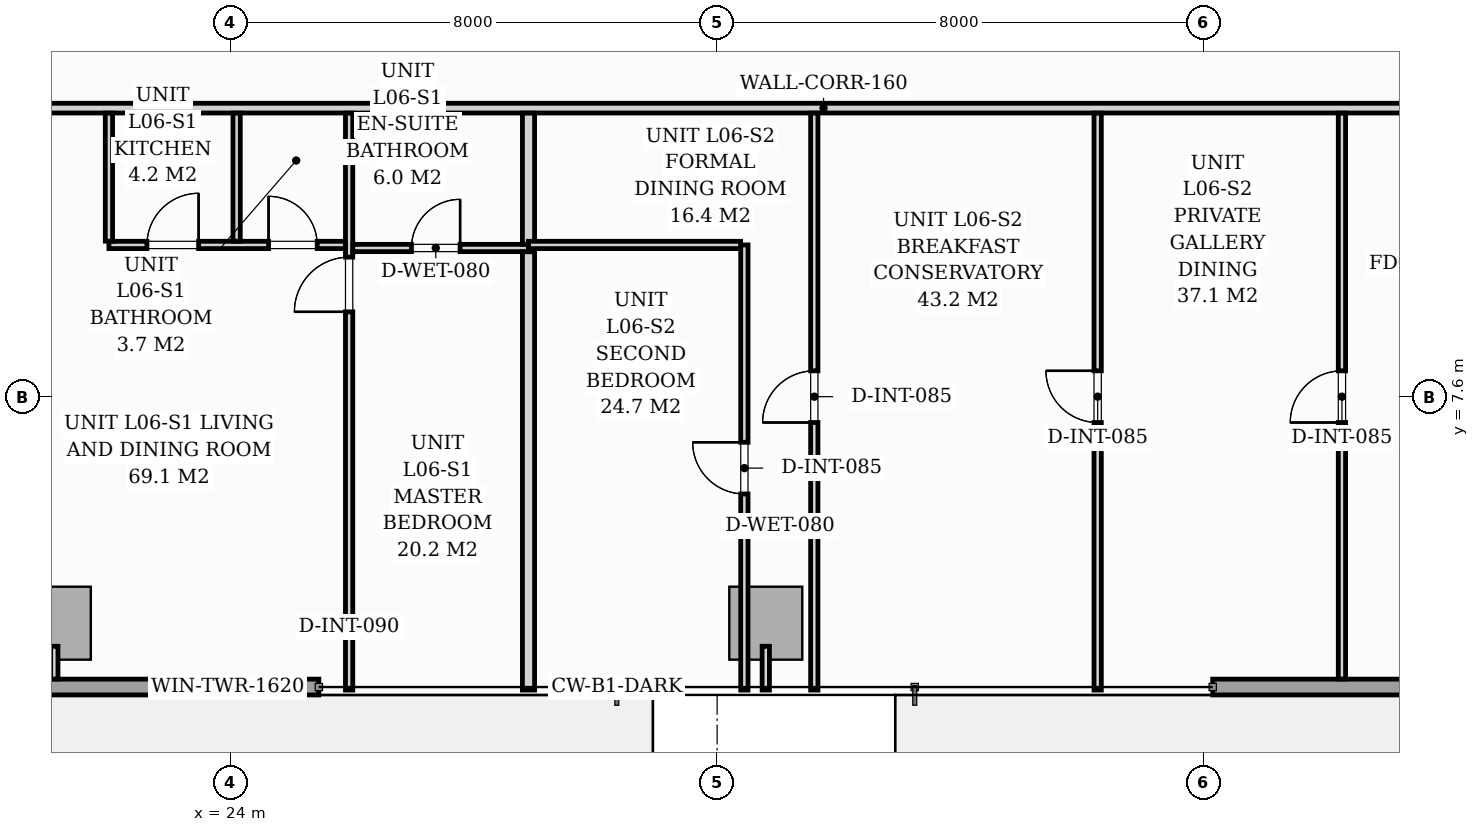
"""IFC4 building model, lengths in metres.
Left out: names, types, materials, properties, quantities, classifications, styles, units other than length and angle.
Written with IfcOpenShell. Run it as: python <this file> out.ifc"""

import sys

from ifc_helpers import new_model, si_unit, direction, frame, frame_2d, origin, origin_2d, place, context, subcontext, project, spatial, rectangle, extrude, source, transform, mapped, element, fill, save


model = new_model("IFC4")
c1 = context("Model", 3, precision=1e-05, world=origin(), true_north=direction((0.0, 1.0)))
c2 = subcontext(c1, "Body", "Model", "MODEL_VIEW")
j1 = project(units=[si_unit("LENGTHUNIT", "METRE"), si_unit("PLANEANGLEUNIT", "RADIAN")], contexts=[c1])
p1 = place(None, origin())
s1 = spatial("IfcSite", under=j1, at=p1, CompositionType="ELEMENT")
p2 = place(p1, origin())
s2 = spatial("IfcBuilding", under=s1, at=p2, CompositionType="ELEMENT")
p3 = place(p2, frame((0.0, 0.0, 26.2)))
s3 = spatial("IfcBuildingStorey", under=s2, at=p3, CompositionType="ELEMENT", Elevation=26.2)
m1 = source(origin(), c2, "Body", "SweptSolid", [
    extrude(rectangle(XDim=1.2, YDim=1.2, at=origin_2d()), origin(), (0.0, 0.0, 1.0), 3.196),
])
for number, where, z_axis, x_axis in (
    (1, (21.1, 3.88, 0.002), (0.0, 0.0, 1.0), (1.0, 0.0, 0.0)),
    (2, (32.8, 3.88, 0.002), (0.0, 0.0, 1.0), (1.0, 0.0, 0.0)),
):
    element("IfcColumn", number, at=place(p3, frame(where, z_axis=z_axis, x_axis=x_axis)), inside=s3, PredefinedType="COLUMN", context=c2, shape_type="MappedRepresentation", body=[
        mapped(m1, transform((0.0, 0.0, 0.0), scale=1.0)),
    ])
p4 = place(p3, frame((57.3, 2.83, 0.0), z_axis=(0.0, 0.0, 1.0), x_axis=(-1.0, 0.0, 0.0)))
e3 = element("IfcWall", 3, at=p4, inside=s3, PredefinedType="STANDARD", context=c2, shape_type="SweptSolid", body=[
    extrude(rectangle(XDim=17.15, YDim=0.26, at=frame_2d((8.575, 0.0))), origin(), (0.0, 0.0, 1.0), 2.94),
])
p5 = place(p4, frame((8.314, 0.0, 0.0)))
e4 = element("IfcOpeningElement", 4, at=p5, cuts=e3, PredefinedType="OPENING", context=c2, shape_type="SweptSolid", body=[
    extrude(rectangle(XDim=1.8, YDim=2.06, at=frame_2d((0.9, 1.03))), frame((0.0, 0.14, 0.0), z_axis=(0.0, -1.0, 0.0), x_axis=(1.0, 0.0, 0.0)), (0.0, 0.0, 1.0), 0.28),
])
p6 = place(p4, frame((2.05, 0.0, 0.65)))
e5 = element("IfcOpeningElement", 5, at=p6, cuts=e3, PredefinedType="OPENING", context=c2, shape_type="SweptSolid", body=[
    extrude(rectangle(XDim=1.6, YDim=1.5, at=frame_2d((0.8, 0.75))), frame((0.0, 0.14, 0.0), z_axis=(0.0, -1.0, 0.0), x_axis=(1.0, 0.0, 0.0)), (0.0, 0.0, 1.0), 0.28),
])
p7 = place(p4, frame((5.675, 0.0, 0.75)))
e6 = element("IfcOpeningElement", 6, at=p7, cuts=e3, PredefinedType="OPENING", context=c2, shape_type="SweptSolid", body=[
    extrude(rectangle(XDim=1.6, YDim=1.5, at=frame_2d((0.8, 0.75))), frame((0.0, 0.14, 0.0), z_axis=(0.0, -1.0, 0.0), x_axis=(1.0, 0.0, 0.0)), (0.0, 0.0, 1.0), 0.28),
])
p8 = place(p3, frame((25.45, 2.83, 0.0), z_axis=(0.0, 0.0, 1.0), x_axis=(-1.0, 0.0, 0.0)))
e7 = element("IfcWall", 7, at=p8, inside=s3, PredefinedType="STANDARD", context=c2, shape_type="SweptSolid", body=[
    extrude(rectangle(XDim=17.15, YDim=0.26, at=frame_2d((8.575, 0.0))), origin(), (0.0, 0.0, 1.0), 2.94),
])
p9 = place(p8, frame((7.49, 0.0, 0.0)))
e8 = element("IfcOpeningElement", 8, at=p9, cuts=e7, PredefinedType="OPENING", context=c2, shape_type="SweptSolid", body=[
    extrude(rectangle(XDim=1.8, YDim=2.06, at=frame_2d((0.9, 1.03))), frame((0.0, 0.14, 0.0), z_axis=(0.0, -1.0, 0.0), x_axis=(1.0, 0.0, 0.0)), (0.0, 0.0, 1.0), 0.28),
])
p10 = place(p8, frame((0.7, 0.0, 0.65)))
e9 = element("IfcOpeningElement", 9, at=p10, cuts=e7, PredefinedType="OPENING", context=c2, shape_type="SweptSolid", body=[
    extrude(rectangle(XDim=1.6, YDim=1.5, at=frame_2d((0.8, 0.75))), frame((0.0, 0.14, 0.0), z_axis=(0.0, -1.0, 0.0), x_axis=(1.0, 0.0, 0.0)), (0.0, 0.0, 1.0), 0.28),
])
p11 = place(p8, frame((12.84, 0.0, 0.75)))
e10 = element("IfcOpeningElement", 10, at=p11, cuts=e7, PredefinedType="OPENING", context=c2, shape_type="SweptSolid", body=[
    extrude(rectangle(XDim=1.6, YDim=1.5, at=frame_2d((0.8, 0.75))), frame((0.0, 0.14, 0.0), z_axis=(0.0, -1.0, 0.0), x_axis=(1.0, 0.0, 0.0)), (0.0, 0.0, 1.0), 0.28),
])
p12 = place(p3, frame((15.2, 12.35, 0.0), z_axis=(0.0, 0.0, 1.0), x_axis=(1.0, 0.0, 0.0)))
e11 = element("IfcWall", 11, at=p12, inside=s3, PredefinedType="PARTITIONING", context=c2, shape_type="SweptSolid", body=[
    extrude(rectangle(XDim=37.1, YDim=0.16, at=frame_2d((18.55, 0.0))), origin(), (0.0, 0.0, 1.0), 2.94),
])
p13 = place(p12, frame((2.964, 0.0, 0.0)))
e12 = element("IfcOpeningElement", 12, at=p13, cuts=e11, PredefinedType="OPENING", context=c2, shape_type="SweptSolid", body=[
    extrude(rectangle(XDim=0.95, YDim=2.06, at=frame_2d((0.475, 1.03))), frame((0.0, 0.09, 0.0), z_axis=(0.0, -1.0, 0.0), x_axis=(1.0, 0.0, 0.0)), (0.0, 0.0, 1.0), 0.18),
])
p14 = place(p12, frame((28.202, 0.0, 0.0)))
e13 = element("IfcOpeningElement", 13, at=p14, cuts=e11, PredefinedType="OPENING", context=c2, shape_type="SweptSolid", body=[
    extrude(rectangle(XDim=0.95, YDim=2.06, at=frame_2d((0.475, 1.03))), frame((0.0, 0.09, 0.0), z_axis=(0.0, -1.0, 0.0), x_axis=(1.0, 0.0, 0.0)), (0.0, 0.0, 1.0), 0.18),
])
p15 = place(p3, frame((25.948, 2.78, 0.0), z_axis=(0.0, 0.0, 1.0), x_axis=(0.0, 1.0, 0.0)))
e14 = element("IfcWall", 14, at=p15, inside=s3, PredefinedType="PARTITIONING", context=c2, shape_type="SweptSolid", body=[
    extrude(rectangle(XDim=9.488, YDim=0.12, at=frame_2d((4.744, 0.0))), origin(), (0.0, 0.0, 1.0), 2.94),
])
p16 = place(p15, frame((6.22, 0.0, 0.0)))
e15 = element("IfcOpeningElement", 15, at=p16, cuts=e14, PredefinedType="OPENING", context=c2, shape_type="SweptSolid", body=[
    extrude(rectangle(XDim=0.9, YDim=2.05, at=frame_2d((0.45, 1.025))), frame((0.0, 0.07, 0.0), z_axis=(0.0, -1.0, 0.0), x_axis=(1.0, 0.0, 0.0)), (0.0, 0.0, 1.0), 0.14),
])
p17 = place(p3, frame((21.998, 10.1, 0.0), z_axis=(0.0, 0.0, 1.0), x_axis=(1.0, 0.0, 0.0)))
e16 = element("IfcWall", 16, at=p17, inside=s3, PredefinedType="PARTITIONING", context=c2, shape_type="SweptSolid", body=[
    extrude(rectangle(XDim=3.888, YDim=0.12, at=frame_2d((1.944, 0.0))), origin(), (0.0, 0.0, 1.0), 2.94),
])
p18 = place(p17, frame((0.625, 0.0, 0.0)))
e17 = element("IfcOpeningElement", 17, at=p18, cuts=e16, PredefinedType="OPENING", context=c2, shape_type="SweptSolid", body=[
    extrude(rectangle(XDim=0.85, YDim=2.05, at=frame_2d((0.425, 1.025))), frame((0.0, 0.07, 0.0), z_axis=(0.0, -1.0, 0.0), x_axis=(1.0, 0.0, 0.0)), (0.0, 0.0, 1.0), 0.14),
])
p19 = place(p17, frame((2.625, 0.0, 0.0)))
e18 = element("IfcOpeningElement", 18, at=p19, cuts=e16, PredefinedType="OPENING", context=c2, shape_type="SweptSolid", body=[
    extrude(rectangle(XDim=0.8, YDim=2.02, at=frame_2d((0.4, 1.01))), frame((0.0, 0.07, 0.0), z_axis=(0.0, -1.0, 0.0), x_axis=(1.0, 0.0, 0.0)), (0.0, 0.0, 1.0), 0.14),
])
for number, where, z_axis, x_axis in (
    (19, (24.098, 10.162, 0.0), (0.0, 0.0, 1.0), (0.0, 1.0, 0.0)),
    (20, (21.998, 10.162, 0.0), (0.0, 0.0, 1.0), (0.0, 1.0, 0.0)),
):
    element("IfcWall", number, at=place(p3, frame(where, z_axis=z_axis, x_axis=x_axis)), inside=s3, PredefinedType="PARTITIONING", context=c2, shape_type="SweptSolid", body=[
        extrude(rectangle(XDim=2.106, YDim=0.12, at=frame_2d((1.053, 0.0))), origin(), (0.0, 0.0, 1.0), 2.94),
    ])
p20 = place(p3, frame((26.01, 10.05, 0.0), z_axis=(0.0, 0.0, 1.0), x_axis=(1.0, 0.0, 0.0)))
e21 = element("IfcWall", 21, at=p20, inside=s3, PredefinedType="PARTITIONING", context=c2, shape_type="SweptSolid", body=[
    extrude(rectangle(XDim=2.888, YDim=0.12, at=frame_2d((1.444, 0.0))), origin(), (0.0, 0.0, 1.0), 2.94),
])
p21 = place(p20, frame((0.963, 0.0, 0.0)))
e22 = element("IfcOpeningElement", 22, at=p21, cuts=e21, PredefinedType="OPENING", context=c2, shape_type="SweptSolid", body=[
    extrude(rectangle(XDim=0.8, YDim=2.02, at=frame_2d((0.4, 1.01))), frame((0.0, 0.07, 0.0), z_axis=(0.0, -1.0, 0.0), x_axis=(1.0, 0.0, 0.0)), (0.0, 0.0, 1.0), 0.14),
])
p22 = place(p3, frame((28.898, 2.78, 0.0), z_axis=(0.0, 0.0, 1.0), x_axis=(0.0, 1.0, 0.0)))
e23 = element("IfcWall", 23, at=p22, inside=s3, PredefinedType="PARTITIONING", context=c2, shape_type="SweptSolid", body=[
    extrude(rectangle(XDim=7.208, YDim=0.2, at=frame_2d((3.604, 0.0))), origin(), (0.0, 0.0, 1.0), 2.94),
])
p23 = place(p3, frame((28.898, 10.112, 0.0), z_axis=(0.0, 0.0, 1.0), x_axis=(0.0, 1.0, 0.0)))
e24 = element("IfcWall", 24, at=p23, inside=s3, PredefinedType="PARTITIONING", context=c2, shape_type="SweptSolid", body=[
    extrude(rectangle(XDim=2.156, YDim=0.2, at=frame_2d((1.078, 0.0))), origin(), (0.0, 0.0, 1.0), 2.94),
])
p24 = place(p3, frame((32.448, 2.78, 0.0), z_axis=(0.0, 0.0, 1.0), x_axis=(0.0, 1.0, 0.0)))
e25 = element("IfcWall", 25, at=p24, inside=s3, PredefinedType="PARTITIONING", context=c2, shape_type="SweptSolid", body=[
    extrude(rectangle(XDim=7.32, YDim=0.12, at=frame_2d((3.66, 0.0))), origin(), (0.0, 0.0, 1.0), 2.94),
])
p25 = place(p24, frame((3.225, 0.0, 0.0)))
e26 = element("IfcOpeningElement", 26, at=p25, cuts=e25, PredefinedType="OPENING", context=c2, shape_type="SweptSolid", body=[
    extrude(rectangle(XDim=0.85, YDim=2.05, at=frame_2d((0.425, 1.025))), frame((0.0, 0.07, 0.0), z_axis=(0.0, -1.0, 0.0), x_axis=(1.0, 0.0, 0.0)), (0.0, 0.0, 1.0), 0.14),
])
p26 = place(p3, frame((28.898, 10.1, 0.0), z_axis=(0.0, 0.0, 1.0), x_axis=(1.0, 0.0, 0.0)))
e27 = element("IfcWall", 27, at=p26, inside=s3, PredefinedType="PARTITIONING", context=c2, shape_type="SweptSolid", body=[
    extrude(rectangle(XDim=3.488, YDim=0.12, at=frame_2d((1.744, 0.0))), origin(), (0.0, 0.0, 1.0), 2.94),
])
p27 = place(p3, frame((33.598, 2.78, 0.0), z_axis=(0.0, 0.0, 1.0), x_axis=(0.0, 1.0, 0.0)))
e28 = element("IfcWall", 28, at=p27, inside=s3, PredefinedType="PARTITIONING", context=c2, shape_type="SweptSolid", body=[
    extrude(rectangle(XDim=9.488, YDim=0.12, at=frame_2d((4.744, 0.0))), origin(), (0.0, 0.0, 1.0), 2.94),
])
p28 = place(p27, frame((4.4, 0.0, 0.0)))
e29 = element("IfcOpeningElement", 29, at=p28, cuts=e28, PredefinedType="OPENING", context=c2, shape_type="SweptSolid", body=[
    extrude(rectangle(XDim=0.85, YDim=2.05, at=frame_2d((0.425, 1.025))), frame((0.0, 0.07, 0.0), z_axis=(0.0, -1.0, 0.0), x_axis=(1.0, 0.0, 0.0)), (0.0, 0.0, 1.0), 0.14),
])
p29 = place(p3, frame((38.258, 2.78, 0.0), z_axis=(0.0, 0.0, 1.0), x_axis=(0.0, 1.0, 0.0)))
e30 = element("IfcWall", 30, at=p29, inside=s3, PredefinedType="PARTITIONING", context=c2, shape_type="SweptSolid", body=[
    extrude(rectangle(XDim=9.488, YDim=0.12, at=frame_2d((4.744, 0.0))), origin(), (0.0, 0.0, 1.0), 2.94),
])
p30 = place(p29, frame((4.4, 0.0, 0.0)))
e31 = element("IfcOpeningElement", 31, at=p30, cuts=e30, PredefinedType="OPENING", context=c2, shape_type="SweptSolid", body=[
    extrude(rectangle(XDim=0.85, YDim=2.05, at=frame_2d((0.425, 1.025))), frame((0.0, 0.07, 0.0), z_axis=(0.0, -1.0, 0.0), x_axis=(1.0, 0.0, 0.0)), (0.0, 0.0, 1.0), 0.14),
])
p31 = place(p3, frame((42.275, 2.962, 0.0), z_axis=(0.0, 0.0, 1.0), x_axis=(0.0, 1.0, 0.0)))
e32 = element("IfcWall", 32, at=p31, inside=s3, PredefinedType="PARTITIONING", context=c2, shape_type="SweptSolid", body=[
    extrude(rectangle(XDim=9.306, YDim=0.12, at=frame_2d((4.653, 0.0))), origin(), (0.0, 0.0, 1.0), 2.94),
])
p32 = place(p31, frame((4.218, 0.0, 0.0)))
e33 = element("IfcOpeningElement", 33, at=p32, cuts=e32, PredefinedType="OPENING", context=c2, shape_type="SweptSolid", body=[
    extrude(rectangle(XDim=0.85, YDim=2.05, at=frame_2d((0.425, 1.025))), frame((0.0, 0.07, 0.0), z_axis=(0.0, -1.0, 0.0), x_axis=(1.0, 0.0, 0.0)), (0.0, 0.0, 1.0), 0.14),
])
p33 = place(p3, frame((21.1, 3.5, 0.0), z_axis=(0.0, 0.0, 1.0), x_axis=(0.0, -1.0, 0.0)))
e34 = element("IfcWall", 34, at=p33, inside=s3, PredefinedType="PARTITIONING", context=c2, shape_type="SweptSolid", body=[
    extrude(rectangle(XDim=0.538, YDim=0.12, at=frame_2d((0.269, 0.0))), origin(), (0.0, 0.0, 1.0), 2.94),
])
p34 = place(p3, frame((32.8, 3.5, 0.0), z_axis=(0.0, 0.0, 1.0), x_axis=(0.0, -1.0, 0.0)))
e35 = element("IfcWall", 35, at=p34, inside=s3, PredefinedType="PARTITIONING", context=c2, shape_type="SweptSolid", body=[
    extrude(rectangle(XDim=0.72, YDim=0.12, at=frame_2d((0.36, 0.0))), origin(), (0.0, 0.0, 1.0), 2.94),
])
m2 = source(origin(), c2, "Body", "SweptSolid", [
    extrude(rectangle(XDim=1.6, YDim=1.5, at=frame_2d((0.8, 0.75))), frame((0.0, 0.03, 0.0), z_axis=(0.0, -1.0, 0.0), x_axis=(1.0, 0.0, 0.0)), (0.0, 0.0, 1.0), 0.06),
])
p35 = place(p10, origin())
e36 = element("IfcWindow", 36, at=p35, inside=s3, PartitioningType="SINGLE_PANEL", PredefinedType="WINDOW", context=c2, shape_type="MappedRepresentation", body=[
    mapped(m2, transform((0.0, 0.0, 0.0), scale=1.0)),
])
fill(e9, e36)
m3 = source(origin(), c2, "Body", "SweptSolid", [
    extrude(rectangle(XDim=0.8, YDim=2.02, at=frame_2d((0.4, 1.01))), frame((0.0, 0.025, 0.0), z_axis=(0.0, -1.0, 0.0), x_axis=(1.0, 0.0, 0.0)), (0.0, 0.0, 1.0), 0.05),
])
p36 = place(p21, origin())
e37 = element("IfcDoor", 37, at=p36, inside=s3, OperationType="SINGLE_SWING_RIGHT", PredefinedType="DOOR", context=c2, shape_type="MappedRepresentation", body=[
    mapped(m3, transform((0.0, 0.0, 0.0), scale=1.0)),
])
fill(e22, e37)
m4 = source(origin(), c2, "Body", "SweptSolid", [
    extrude(rectangle(XDim=0.9, YDim=2.05, at=frame_2d((0.45, 1.025))), frame((0.0, 0.025, 0.0), z_axis=(0.0, -1.0, 0.0), x_axis=(1.0, 0.0, 0.0)), (0.0, 0.0, 1.0), 0.05),
])
p37 = place(p16, origin())
e38 = element("IfcDoor", 38, at=p37, inside=s3, OperationType="SINGLE_SWING_LEFT", PredefinedType="DOOR", context=c2, shape_type="MappedRepresentation", body=[
    mapped(m4, transform((0.0, 0.0, 0.0), scale=1.0)),
])
fill(e15, e38)
m5 = source(origin(), c2, "Body", "SweptSolid", [
    extrude(rectangle(XDim=0.85, YDim=2.05, at=frame_2d((0.425, 1.025))), frame((0.0, 0.025, 0.0), z_axis=(0.0, -1.0, 0.0), x_axis=(1.0, 0.0, 0.0)), (0.0, 0.0, 1.0), 0.05),
])
p38 = place(p18, origin())
e39 = element("IfcDoor", 39, at=p38, inside=s3, OperationType="SINGLE_SWING_RIGHT", PredefinedType="DOOR", context=c2, shape_type="MappedRepresentation", body=[
    mapped(m5, transform((0.0, 0.0, 0.0), scale=1.0)),
])
fill(e17, e39)
p39 = place(p19, origin())
e40 = element("IfcDoor", 40, at=p39, inside=s3, OperationType="SINGLE_SWING_LEFT", PredefinedType="DOOR", context=c2, shape_type="MappedRepresentation", body=[
    mapped(m3, transform((0.0, 0.0, 0.0), scale=1.0)),
])
fill(e18, e40)
p40 = place(p25, origin())
e41 = element("IfcDoor", 41, at=p40, inside=s3, OperationType="SINGLE_SWING_RIGHT", PredefinedType="DOOR", context=c2, shape_type="MappedRepresentation", body=[
    mapped(m5, transform((0.0, 0.0, 0.0), scale=1.0)),
])
fill(e26, e41)
p41 = place(p28, origin())
e42 = element("IfcDoor", 42, at=p41, inside=s3, OperationType="SINGLE_SWING_LEFT", PredefinedType="DOOR", context=c2, shape_type="MappedRepresentation", body=[
    mapped(m5, transform((0.0, 0.0, 0.0), scale=1.0)),
])
fill(e29, e42)
p42 = place(p30, origin())
e43 = element("IfcDoor", 43, at=p42, inside=s3, OperationType="SINGLE_SWING_RIGHT", PredefinedType="DOOR", context=c2, shape_type="MappedRepresentation", body=[
    mapped(m5, transform((0.0, 0.0, 0.0), scale=1.0)),
])
fill(e31, e43)
p43 = place(p32, origin())
e44 = element("IfcDoor", 44, at=p43, inside=s3, OperationType="SINGLE_SWING_LEFT", PredefinedType="DOOR", context=c2, shape_type="MappedRepresentation", body=[
    mapped(m5, transform((0.0, 0.0, 0.0), scale=1.0)),
])
fill(e33, e44)
save(model, sys.argv[1])
